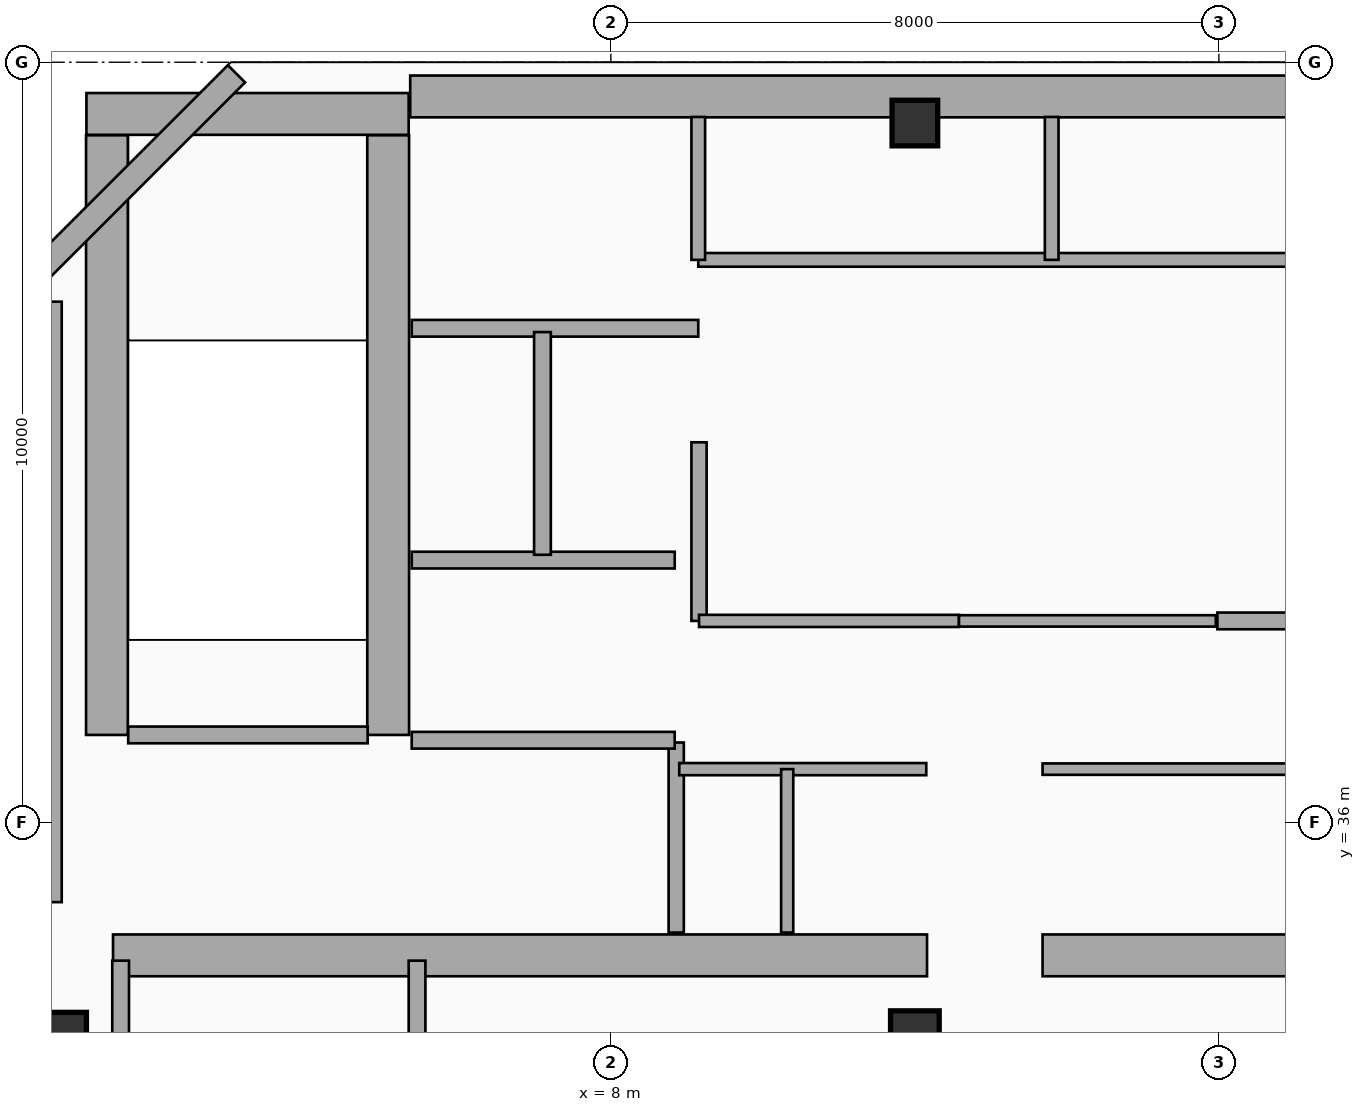
"""IFC4 building model, lengths in metres.
Left out: names, types, materials, properties, quantities, classifications, styles, units other than length and angle.
Written with IfcOpenShell. Run it as: python <this file> out.ifc"""

import sys

from ifc_helpers import new_model, si_unit, direction, frame, frame_2d, origin, origin_2d, place, context, subcontext, project, spatial, rectangle, extrude, element, fill, save


model = new_model("IFC4")
c1 = context("Model", 3, precision=1e-05, world=origin(), true_north=direction((0.0, 1.0)))
c2 = subcontext(c1, "Body", "Model", "MODEL_VIEW")
j1 = project(units=[si_unit("LENGTHUNIT", "METRE"), si_unit("PLANEANGLEUNIT", "RADIAN")], contexts=[c1])
p1 = place(None, origin())
s1 = spatial("IfcSite", under=j1, at=p1, CompositionType="ELEMENT")
p2 = place(p1, origin())
s2 = spatial("IfcBuilding", under=s1, at=p2, CompositionType="ELEMENT")
p3 = place(p2, frame((0.0, 0.0, 347.49)))
s3 = spatial("IfcBuildingStorey", under=s2, at=p3, CompositionType="ELEMENT", Elevation=347.49)
p4 = place(p3, frame((5.36, 45.55, 0.0), z_axis=(0.0, 0.0, 1.0), x_axis=(1.0, 0.0, 0.0)))
e1 = element("IfcWall", 1, at=p4, inside=s3, PredefinedType="SHEAR", context=c2, shape_type="SweptSolid", body=[
    extrude(rectangle(XDim=13.98, YDim=0.55, at=frame_2d((6.99, 0.0))), origin(), (0.0, 0.0, 1.0), 4.62),
])
p5 = place(p3, frame((0.5, 34.95, 0.0), z_axis=(0.0, 0.0, 1.0), x_axis=(0.0, 1.0, 0.0)))
e2 = element("IfcWall", 2, at=p5, inside=s3, PredefinedType="SHEAR", context=c2, shape_type="SweptSolid", body=[
    extrude(rectangle(XDim=7.9, YDim=0.55, at=frame_2d((3.95, 0.0))), origin(), (0.0, 0.0, 1.0), 4.62),
])
p6 = place(p3, frame((1.45, 34.25, 0.0), z_axis=(0.0, 0.0, 1.0), x_axis=(1.0, 0.0, 0.0)))
e3 = element("IfcWall", 3, at=p6, inside=s3, PredefinedType="SHEAR", context=c2, shape_type="SweptSolid", body=[
    extrude(rectangle(XDim=10.71, YDim=0.55, at=frame_2d((5.355, 0.0))), origin(), (0.0, 0.0, 1.0), 4.62),
])
p7 = place(p6, frame((7.25, 0.0, 0.0), z_axis=(0.0, 0.0, 1.0), x_axis=(-1.0, 0.0, 0.0)))
e4 = element("IfcOpeningElement", 4, at=p7, cuts=e3, PredefinedType="OPENING", context=c2, shape_type="SweptSolid", body=[
    extrude(rectangle(XDim=1.1, YDim=2.15, at=frame_2d((0.55, 1.075))), frame((0.0, 0.285, 0.0), z_axis=(0.0, -1.0, 0.0), x_axis=(1.0, 0.0, 0.0)), (0.0, 0.0, 1.0), 0.57),
])
p8 = place(p3, frame((13.68, 34.25, 0.0), z_axis=(0.0, 0.0, 1.0), x_axis=(1.0, 0.0, 0.0)))
e5 = element("IfcWall", 5, at=p8, inside=s3, PredefinedType="SHEAR", context=c2, shape_type="SweptSolid", body=[
    extrude(rectangle(XDim=6.12, YDim=0.55, at=frame_2d((3.06, 0.0))), origin(), (0.0, 0.0, 1.0), 4.62),
])
for number, where, z_axis, x_axis in (
    (6, (1.37, 37.15, 0.0), (0.0, 0.0, 1.0), (0.0, 1.0, 0.0)),
    (7, (5.07, 37.15, 0.0), (0.0, 0.0, 1.0), (0.0, 1.0, 0.0)),
):
    element("IfcWall", number, at=place(p3, frame(where, z_axis=z_axis, x_axis=x_axis)), inside=s3, PredefinedType="SHEAR", context=c2, shape_type="SweptSolid", body=[
        extrude(rectangle(XDim=7.89, YDim=0.55, at=frame_2d((3.945, 0.0))), origin(), (0.0, 0.0, 1.0), 4.62),
    ])
p9 = place(p3, frame((1.1, 45.32, 0.0), z_axis=(0.0, 0.0, 1.0), x_axis=(1.0, 0.0, 0.0)))
e8 = element("IfcWall", 8, at=p9, inside=s3, PredefinedType="SHEAR", context=c2, shape_type="SweptSolid", body=[
    extrude(rectangle(XDim=4.24, YDim=0.55, at=frame_2d((2.12, 0.0))), origin(), (0.0, 0.0, 1.0), 4.62),
])
p10 = place(p9, frame((2.05, 0.0, 1.05)))
e9 = element("IfcOpeningElement", 9, at=p10, cuts=e8, PredefinedType="OPENING", context=c2, shape_type="SweptSolid", body=[
    extrude(rectangle(XDim=1.4, YDim=1.8, at=frame_2d((0.7, 0.9))), frame((0.0, 0.285, 0.0), z_axis=(0.0, -1.0, 0.0), x_axis=(1.0, 0.0, 0.0)), (0.0, 0.0, 1.0), 0.57),
])
p11 = place(p3, frame((0.8, 33.2, 0.0), z_axis=(0.0, 0.0, 1.0), x_axis=(1.0, 0.0, 0.0)))
e10 = element("IfcColumn", 10, at=p11, inside=s3, PredefinedType="COLUMN", context=c2, shape_type="SweptSolid", body=[
    extrude(rectangle(XDim=0.6, YDim=0.6, at=origin_2d()), origin(), (0.0, 0.0, 1.0), 4.62),
])
p12 = place(p3, frame((12.0, 33.2, 0.0), z_axis=(0.0, 0.0, 1.0), x_axis=(1.0, 0.0, 0.0)))
e11 = element("IfcColumn", 11, at=p12, inside=s3, PredefinedType="COLUMN", context=c2, shape_type="SweptSolid", body=[
    extrude(rectangle(XDim=0.64, YDim=0.64, at=origin_2d()), origin(), (0.0, 0.0, 1.0), 4.62),
])
p13 = place(p3, frame((12.0, 45.2, 0.0), z_axis=(0.0, 0.0, 1.0), x_axis=(1.0, 0.0, 0.0)))
e12 = element("IfcColumn", 12, at=p13, inside=s3, PredefinedType="COLUMN", context=c2, shape_type="SweptSolid", body=[
    extrude(rectangle(XDim=0.6, YDim=0.6, at=origin_2d()), origin(), (0.0, 0.0, 1.0), 4.62),
])
p14 = place(p3, frame((3.074, 45.848, 0.0), z_axis=(0.0, 0.0, 1.0), x_axis=(-0.707106781187, -0.707106781187, 0.0)))
e13 = element("IfcWall", 13, at=p14, inside=s3, PredefinedType="SOLIDWALL", context=c2, shape_type="SweptSolid", body=[
    extrude(rectangle(XDim=4.133, YDim=0.32, at=frame_2d((2.066, 0.0))), origin(), (0.0, 0.0, 1.0), 4.37),
])
p15 = place(p3, frame((1.65, 37.15, 0.0), z_axis=(0.0, 0.0, 1.0), x_axis=(1.0, 0.0, 0.0)))
e14 = element("IfcWall", 14, at=p15, inside=s3, PredefinedType="PARTITIONING", context=c2, shape_type="SweptSolid", body=[
    extrude(rectangle(XDim=3.15, YDim=0.22, at=frame_2d((1.575, 0.0))), origin(), (0.0, 0.0, 1.0), 4.37),
])
p16 = place(p15, frame((2.05, 0.0, 0.0), z_axis=(0.0, 0.0, 1.0), x_axis=(-1.0, 0.0, 0.0)))
e15 = element("IfcOpeningElement", 15, at=p16, cuts=e14, PredefinedType="OPENING", context=c2, shape_type="SweptSolid", body=[
    extrude(rectangle(XDim=1.05, YDim=2.15, at=frame_2d((0.525, 1.075))), frame((0.0, 0.12, 0.0), z_axis=(0.0, -1.0, 0.0), x_axis=(1.0, 0.0, 0.0)), (0.0, 0.0, 1.0), 0.24),
])
p17 = place(p3, frame((8.86, 34.55, 0.0), z_axis=(0.0, 0.0, 1.0), x_axis=(0.0, 1.0, 0.0)))
e16 = element("IfcWall", 16, at=p17, inside=s3, PredefinedType="PARTITIONING", context=c2, shape_type="SweptSolid", body=[
    extrude(rectangle(XDim=2.5, YDim=0.2, at=frame_2d((1.25, 0.0))), origin(), (0.0, 0.0, 1.0), 4.37),
])
p18 = place(p3, frame((5.38, 37.08, 0.0), z_axis=(0.0, 0.0, 1.0), x_axis=(1.0, 0.0, 0.0)))
e17 = element("IfcWall", 17, at=p18, inside=s3, PredefinedType="PARTITIONING", context=c2, shape_type="SweptSolid", body=[
    extrude(rectangle(XDim=3.46, YDim=0.22, at=frame_2d((1.73, 0.0))), origin(), (0.0, 0.0, 1.0), 4.37),
])
p19 = place(p18, frame((1.55, 0.0, 0.0), z_axis=(0.0, 0.0, 1.0), x_axis=(-1.0, 0.0, 0.0)))
e18 = element("IfcOpeningElement", 18, at=p19, cuts=e17, PredefinedType="OPENING", context=c2, shape_type="SweptSolid", body=[
    extrude(rectangle(XDim=1.2, YDim=2.2, at=frame_2d((0.6, 1.1))), frame((0.0, 0.12, 0.0), z_axis=(0.0, -1.0, 0.0), x_axis=(1.0, 0.0, 0.0)), (0.0, 0.0, 1.0), 0.24),
])
p20 = place(p18, frame((3.22, 0.0, 0.0), z_axis=(0.0, 0.0, 1.0), x_axis=(-1.0, 0.0, 0.0)))
e19 = element("IfcOpeningElement", 19, at=p20, cuts=e17, PredefinedType="OPENING", context=c2, shape_type="SweptSolid", body=[
    extrude(rectangle(XDim=1.2, YDim=2.2, at=frame_2d((0.6, 1.1))), frame((0.0, 0.12, 0.0), z_axis=(0.0, -1.0, 0.0), x_axis=(1.0, 0.0, 0.0)), (0.0, 0.0, 1.0), 0.24),
])
p21 = place(p3, frame((5.38, 39.45, 0.0), z_axis=(0.0, 0.0, 1.0), x_axis=(1.0, 0.0, 0.0)))
e20 = element("IfcWall", 20, at=p21, inside=s3, PredefinedType="PARTITIONING", context=c2, shape_type="SweptSolid", body=[
    extrude(rectangle(XDim=3.46, YDim=0.22, at=frame_2d((1.73, 0.0))), origin(), (0.0, 0.0, 1.0), 4.37),
])
p22 = place(p3, frame((5.38, 42.5, 0.0), z_axis=(0.0, 0.0, 1.0), x_axis=(1.0, 0.0, 0.0)))
e21 = element("IfcWall", 21, at=p22, inside=s3, PredefinedType="PARTITIONING", context=c2, shape_type="SweptSolid", body=[
    extrude(rectangle(XDim=3.77, YDim=0.22, at=frame_2d((1.885, 0.0))), origin(), (0.0, 0.0, 1.0), 4.37),
])
p23 = place(p22, frame((1.75, 0.0, 0.0), z_axis=(0.0, 0.0, 1.0), x_axis=(-1.0, 0.0, 0.0)))
e22 = element("IfcOpeningElement", 22, at=p23, cuts=e21, PredefinedType="OPENING", context=c2, shape_type="SweptSolid", body=[
    extrude(rectangle(XDim=1.4, YDim=2.2, at=frame_2d((0.7, 1.1))), frame((0.0, 0.12, 0.0), z_axis=(0.0, -1.0, 0.0), x_axis=(1.0, 0.0, 0.0)), (0.0, 0.0, 1.0), 0.24),
])
p24 = place(p22, frame((3.53, 0.0, 0.0), z_axis=(0.0, 0.0, 1.0), x_axis=(-1.0, 0.0, 0.0)))
e23 = element("IfcOpeningElement", 23, at=p24, cuts=e21, PredefinedType="OPENING", context=c2, shape_type="SweptSolid", body=[
    extrude(rectangle(XDim=1.4, YDim=2.2, at=frame_2d((0.7, 1.1))), frame((0.0, 0.12, 0.0), z_axis=(0.0, -1.0, 0.0), x_axis=(1.0, 0.0, 0.0)), (0.0, 0.0, 1.0), 0.24),
])
p25 = place(p3, frame((7.1, 39.52, 0.0), z_axis=(0.0, 0.0, 1.0), x_axis=(0.0, 1.0, 0.0)))
e24 = element("IfcWall", 24, at=p25, inside=s3, PredefinedType="PARTITIONING", context=c2, shape_type="SweptSolid", body=[
    extrude(rectangle(XDim=2.93, YDim=0.22, at=frame_2d((1.465, 0.0))), origin(), (0.0, 0.0, 1.0), 4.37),
])
for number, where, z_axis, x_axis in (
    (25, (1.55, 31.8, 0.0), (0.0, 0.0, 1.0), (0.0, 1.0, 0.0)),
    (26, (5.45, 31.8, 0.0), (0.0, 0.0, 1.0), (0.0, 1.0, 0.0)),
):
    element("IfcWall", number, at=place(p3, frame(where, z_axis=z_axis, x_axis=x_axis)), inside=s3, PredefinedType="PARTITIONING", context=c2, shape_type="SweptSolid", body=[
        extrude(rectangle(XDim=2.38, YDim=0.22, at=frame_2d((1.19, 0.0))), origin(), (0.0, 0.0, 1.0), 4.37),
    ])
p26 = place(p3, frame((9.16, 38.65, 0.0), z_axis=(0.0, 0.0, 1.0), x_axis=(0.0, 1.0, 0.0)))
e27 = element("IfcWall", 27, at=p26, inside=s3, PredefinedType="PARTITIONING", context=c2, shape_type="SweptSolid", body=[
    extrude(rectangle(XDim=2.35, YDim=0.2, at=frame_2d((1.175, 0.0))), origin(), (0.0, 0.0, 1.0), 4.37),
])
p27 = place(p3, frame((8.9, 36.7, 0.0), z_axis=(0.0, 0.0, 1.0), x_axis=(1.0, 0.0, 0.0)))
e28 = element("IfcWall", 28, at=p27, inside=s3, PredefinedType="PARTITIONING", context=c2, shape_type="SweptSolid", body=[
    extrude(rectangle(XDim=3.25, YDim=0.16, at=frame_2d((1.625, 0.0))), origin(), (0.0, 0.0, 1.0), 4.37),
])
p28 = place(p27, frame((0.26, 0.0, 0.0)))
e29 = element("IfcOpeningElement", 29, at=p28, cuts=e28, PredefinedType="OPENING", context=c2, shape_type="SweptSolid", body=[
    extrude(rectangle(XDim=0.9, YDim=2.15, at=frame_2d((0.45, 1.075))), frame((0.0, 0.09, 0.0), z_axis=(0.0, -1.0, 0.0), x_axis=(1.0, 0.0, 0.0)), (0.0, 0.0, 1.0), 0.18),
])
p29 = place(p27, frame((1.68, 0.0, 0.0)))
e30 = element("IfcOpeningElement", 30, at=p29, cuts=e28, PredefinedType="OPENING", context=c2, shape_type="SweptSolid", body=[
    extrude(rectangle(XDim=0.9, YDim=2.15, at=frame_2d((0.45, 1.075))), frame((0.0, 0.09, 0.0), z_axis=(0.0, -1.0, 0.0), x_axis=(1.0, 0.0, 0.0)), (0.0, 0.0, 1.0), 0.18),
])
p30 = place(p3, frame((10.32, 34.55, 0.0), z_axis=(0.0, 0.0, 1.0), x_axis=(0.0, 1.0, 0.0)))
e31 = element("IfcWall", 31, at=p30, inside=s3, PredefinedType="PARTITIONING", context=c2, shape_type="SweptSolid", body=[
    extrude(rectangle(XDim=2.15, YDim=0.16, at=frame_2d((1.075, 0.0))), origin(), (0.0, 0.0, 1.0), 4.37),
])
p31 = place(p3, frame((9.16, 38.65, 0.0), z_axis=(0.0, 0.0, 1.0), x_axis=(1.0, 0.0, 0.0)))
e32 = element("IfcWall", 32, at=p31, inside=s3, PredefinedType="PARTITIONING", context=c2, shape_type="SweptSolid", body=[
    extrude(rectangle(XDim=3.42, YDim=0.16, at=frame_2d((1.71, 0.0))), origin(), (0.0, 0.0, 1.0), 4.37),
])
p32 = place(p31, frame((2.15, 0.0, 0.0), z_axis=(0.0, 0.0, 1.0), x_axis=(-1.0, 0.0, 0.0)))
e33 = element("IfcOpeningElement", 33, at=p32, cuts=e32, PredefinedType="OPENING", context=c2, shape_type="SweptSolid", body=[
    extrude(rectangle(XDim=0.95, YDim=2.15, at=frame_2d((0.475, 1.075))), frame((0.0, 0.09, 0.0), z_axis=(0.0, -1.0, 0.0), x_axis=(1.0, 0.0, 0.0)), (0.0, 0.0, 1.0), 0.18),
])
p33 = place(p3, frame((13.68, 36.7, 0.0), z_axis=(0.0, 0.0, 1.0), x_axis=(1.0, 0.0, 0.0)))
e34 = element("IfcWall", 34, at=p33, inside=s3, PredefinedType="PARTITIONING", context=c2, shape_type="SweptSolid", body=[
    extrude(rectangle(XDim=3.28, YDim=0.15, at=frame_2d((1.64, 0.0))), origin(), (0.0, 0.0, 1.0), 4.37),
])
p34 = place(p33, frame((1.15, 0.0, 0.0)))
e35 = element("IfcOpeningElement", 35, at=p34, cuts=e34, PredefinedType="OPENING", context=c2, shape_type="SweptSolid", body=[
    extrude(rectangle(XDim=0.95, YDim=2.15, at=frame_2d((0.475, 1.075))), frame((0.0, 0.085, 0.0), z_axis=(0.0, -1.0, 0.0), x_axis=(1.0, 0.0, 0.0)), (0.0, 0.0, 1.0), 0.17),
])
p35 = place(p3, frame((12.58, 38.65, 0.0), z_axis=(0.0, 0.0, 1.0), x_axis=(1.0, 0.0, 0.0)))
e36 = element("IfcWall", 36, at=p35, inside=s3, PredefinedType="PARTITIONING", context=c2, shape_type="SweptSolid", body=[
    extrude(rectangle(XDim=3.38, YDim=0.15, at=frame_2d((1.69, 0.0))), origin(), (0.0, 0.0, 1.0), 4.37),
])
p36 = place(p35, frame((2.2, 0.0, 0.0), z_axis=(0.0, 0.0, 1.0), x_axis=(-1.0, 0.0, 0.0)))
e37 = element("IfcOpeningElement", 37, at=p36, cuts=e36, PredefinedType="OPENING", context=c2, shape_type="SweptSolid", body=[
    extrude(rectangle(XDim=1.05, YDim=2.15, at=frame_2d((0.525, 1.075))), frame((0.0, 0.085, 0.0), z_axis=(0.0, -1.0, 0.0), x_axis=(1.0, 0.0, 0.0)), (0.0, 0.0, 1.0), 0.17),
])
p37 = place(p3, frame((15.98, 38.65, 0.0), z_axis=(0.0, 0.0, 1.0), x_axis=(1.0, 0.0, 0.0)))
e38 = element("IfcWall", 38, at=p37, inside=s3, PredefinedType="PARTITIONING", context=c2, shape_type="SweptSolid", body=[
    extrude(rectangle(XDim=1.72, YDim=0.22, at=frame_2d((0.86, 0.0))), origin(), (0.0, 0.0, 1.0), 4.37),
])
p38 = place(p3, frame((9.15, 43.4, 0.0), z_axis=(0.0, 0.0, 1.0), x_axis=(1.0, 0.0, 0.0)))
e39 = element("IfcWall", 39, at=p38, inside=s3, PredefinedType="PLUMBINGWALL", context=c2, shape_type="SweptSolid", body=[
    extrude(rectangle(XDim=9.33, YDim=0.18, at=frame_2d((4.665, 0.0))), origin(), (0.0, 0.0, 1.0), 4.37),
])
p39 = place(p38, frame((1.88, 0.0, 0.0)))
e40 = element("IfcOpeningElement", 40, at=p39, cuts=e39, PredefinedType="OPENING", context=c2, shape_type="SweptSolid", body=[
    extrude(rectangle(XDim=0.92, YDim=2.1, at=frame_2d((0.46, 1.05))), frame((0.0, 0.1, 0.0), z_axis=(0.0, -1.0, 0.0), x_axis=(1.0, 0.0, 0.0)), (0.0, 0.0, 1.0), 0.2),
])
p40 = place(p38, frame((6.515, 0.0, 0.0)))
e41 = element("IfcOpeningElement", 41, at=p40, cuts=e39, PredefinedType="OPENING", context=c2, shape_type="SweptSolid", body=[
    extrude(rectangle(XDim=0.92, YDim=2.1, at=frame_2d((0.46, 1.05))), frame((0.0, 0.1, 0.0), z_axis=(0.0, -1.0, 0.0), x_axis=(1.0, 0.0, 0.0)), (0.0, 0.0, 1.0), 0.2),
])
for number, where, z_axis, x_axis in (
    (42, (9.15, 43.4, 0.0), (0.0, 0.0, 1.0), (0.0, 1.0, 0.0)),
    (43, (13.8, 43.4, 0.0), (0.0, 0.0, 1.0), (0.0, 1.0, 0.0)),
):
    element("IfcWall", number, at=place(p3, frame(where, z_axis=z_axis, x_axis=x_axis)), inside=s3, PredefinedType="PLUMBINGWALL", context=c2, shape_type="SweptSolid", body=[
        extrude(rectangle(XDim=1.88, YDim=0.18, at=frame_2d((0.94, 0.0))), origin(), (0.0, 0.0, 1.0), 4.37),
    ])
p41 = place(p10, origin())
e44 = element("IfcWindow", 44, at=p41, inside=s3, PartitioningType="SINGLE_PANEL", PredefinedType="WINDOW", context=c2, shape_type="SweptSolid", body=[
    extrude(rectangle(XDim=1.4, YDim=1.8, at=frame_2d((0.7, 0.9))), frame((0.0, 0.03, 0.0), z_axis=(0.0, -1.0, 0.0), x_axis=(1.0, 0.0, 0.0)), (0.0, 0.0, 1.0), 0.06),
])
fill(e9, e44)
p42 = place(p16, origin())
e45 = element("IfcDoor", 45, at=p42, inside=s3, OperationType="SINGLE_SWING_LEFT", PredefinedType="DOOR", context=c2, shape_type="SweptSolid", body=[
    extrude(rectangle(XDim=1.05, YDim=2.15, at=frame_2d((0.525, 1.075))), frame((0.0, 0.025, 0.0), z_axis=(0.0, -1.0, 0.0), x_axis=(1.0, 0.0, 0.0)), (0.0, 0.0, 1.0), 0.05),
])
fill(e15, e45)
p43 = place(p7, origin())
e46 = element("IfcDoor", 46, at=p43, inside=s3, OperationType="SINGLE_SWING_RIGHT", PredefinedType="DOOR", context=c2, shape_type="SweptSolid", body=[
    extrude(rectangle(XDim=1.1, YDim=2.15, at=frame_2d((0.55, 1.075))), frame((0.0, 0.025, 0.0), z_axis=(0.0, -1.0, 0.0), x_axis=(1.0, 0.0, 0.0)), (0.0, 0.0, 1.0), 0.05),
])
fill(e4, e46)
p44 = place(p19, origin())
e47 = element("IfcDoor", 47, at=p44, inside=s3, OperationType="SLIDING_TO_RIGHT", PredefinedType="DOOR", context=c2, shape_type="SweptSolid", body=[
    extrude(rectangle(XDim=1.2, YDim=2.2, at=frame_2d((0.6, 1.1))), frame((0.0, 0.025, 0.0), z_axis=(0.0, -1.0, 0.0), x_axis=(1.0, 0.0, 0.0)), (0.0, 0.0, 1.0), 0.05),
])
fill(e18, e47)
p45 = place(p20, origin())
e48 = element("IfcDoor", 48, at=p45, inside=s3, OperationType="SLIDING_TO_RIGHT", PredefinedType="DOOR", context=c2, shape_type="SweptSolid", body=[
    extrude(rectangle(XDim=1.2, YDim=2.2, at=frame_2d((0.6, 1.1))), frame((0.0, 0.025, 0.0), z_axis=(0.0, -1.0, 0.0), x_axis=(1.0, 0.0, 0.0)), (0.0, 0.0, 1.0), 0.05),
])
fill(e19, e48)
p46 = place(p23, origin())
e49 = element("IfcDoor", 49, at=p46, inside=s3, OperationType="SLIDING_TO_LEFT", PredefinedType="DOOR", context=c2, shape_type="SweptSolid", body=[
    extrude(rectangle(XDim=1.4, YDim=2.2, at=frame_2d((0.7, 1.1))), frame((0.0, 0.025, 0.0), z_axis=(0.0, -1.0, 0.0), x_axis=(1.0, 0.0, 0.0)), (0.0, 0.0, 1.0), 0.05),
])
fill(e22, e49)
p47 = place(p24, origin())
e50 = element("IfcDoor", 50, at=p47, inside=s3, OperationType="SLIDING_TO_LEFT", PredefinedType="DOOR", context=c2, shape_type="SweptSolid", body=[
    extrude(rectangle(XDim=1.4, YDim=2.2, at=frame_2d((0.7, 1.1))), frame((0.0, 0.025, 0.0), z_axis=(0.0, -1.0, 0.0), x_axis=(1.0, 0.0, 0.0)), (0.0, 0.0, 1.0), 0.05),
])
fill(e23, e50)
p48 = place(p28, origin())
e51 = element("IfcDoor", 51, at=p48, inside=s3, OperationType="SINGLE_SWING_RIGHT", PredefinedType="DOOR", context=c2, shape_type="SweptSolid", body=[
    extrude(rectangle(XDim=0.9, YDim=2.15, at=frame_2d((0.45, 1.075))), frame((0.0, 0.025, 0.0), z_axis=(0.0, -1.0, 0.0), x_axis=(1.0, 0.0, 0.0)), (0.0, 0.0, 1.0), 0.05),
])
fill(e29, e51)
p49 = place(p29, origin())
e52 = element("IfcDoor", 52, at=p49, inside=s3, OperationType="SINGLE_SWING_LEFT", PredefinedType="DOOR", context=c2, shape_type="SweptSolid", body=[
    extrude(rectangle(XDim=0.9, YDim=2.15, at=frame_2d((0.45, 1.075))), frame((0.0, 0.025, 0.0), z_axis=(0.0, -1.0, 0.0), x_axis=(1.0, 0.0, 0.0)), (0.0, 0.0, 1.0), 0.05),
])
fill(e30, e52)
p50 = place(p32, origin())
e53 = element("IfcDoor", 53, at=p50, inside=s3, OperationType="SINGLE_SWING_RIGHT", PredefinedType="DOOR", context=c2, shape_type="SweptSolid", body=[
    extrude(rectangle(XDim=0.95, YDim=2.15, at=frame_2d((0.475, 1.075))), frame((0.0, 0.025, 0.0), z_axis=(0.0, -1.0, 0.0), x_axis=(1.0, 0.0, 0.0)), (0.0, 0.0, 1.0), 0.05),
])
fill(e33, e53)
p51 = place(p34, origin())
e54 = element("IfcDoor", 54, at=p51, inside=s3, OperationType="SINGLE_SWING_LEFT", PredefinedType="DOOR", context=c2, shape_type="SweptSolid", body=[
    extrude(rectangle(XDim=0.95, YDim=2.15, at=frame_2d((0.475, 1.075))), frame((0.0, 0.025, 0.0), z_axis=(0.0, -1.0, 0.0), x_axis=(1.0, 0.0, 0.0)), (0.0, 0.0, 1.0), 0.05),
])
fill(e35, e54)
p52 = place(p36, origin())
e55 = element("IfcDoor", 55, at=p52, inside=s3, OperationType="SINGLE_SWING_RIGHT", PredefinedType="DOOR", context=c2, shape_type="SweptSolid", body=[
    extrude(rectangle(XDim=1.05, YDim=2.15, at=frame_2d((0.525, 1.075))), frame((0.0, 0.025, 0.0), z_axis=(0.0, -1.0, 0.0), x_axis=(1.0, 0.0, 0.0)), (0.0, 0.0, 1.0), 0.05),
])
fill(e37, e55)
p53 = place(p39, origin())
e56 = element("IfcDoor", 56, at=p53, inside=s3, OperationType="SINGLE_SWING_LEFT", PredefinedType="DOOR", context=c2, shape_type="SweptSolid", body=[
    extrude(rectangle(XDim=0.92, YDim=2.1, at=frame_2d((0.46, 1.05))), frame((0.0, 0.025, 0.0), z_axis=(0.0, -1.0, 0.0), x_axis=(1.0, 0.0, 0.0)), (0.0, 0.0, 1.0), 0.05),
])
fill(e40, e56)
p54 = place(p40, origin())
e57 = element("IfcDoor", 57, at=p54, inside=s3, OperationType="SINGLE_SWING_RIGHT", PredefinedType="DOOR", context=c2, shape_type="SweptSolid", body=[
    extrude(rectangle(XDim=0.92, YDim=2.1, at=frame_2d((0.46, 1.05))), frame((0.0, 0.025, 0.0), z_axis=(0.0, -1.0, 0.0), x_axis=(1.0, 0.0, 0.0)), (0.0, 0.0, 1.0), 0.05),
])
fill(e41, e57)
save(model, sys.argv[1])
